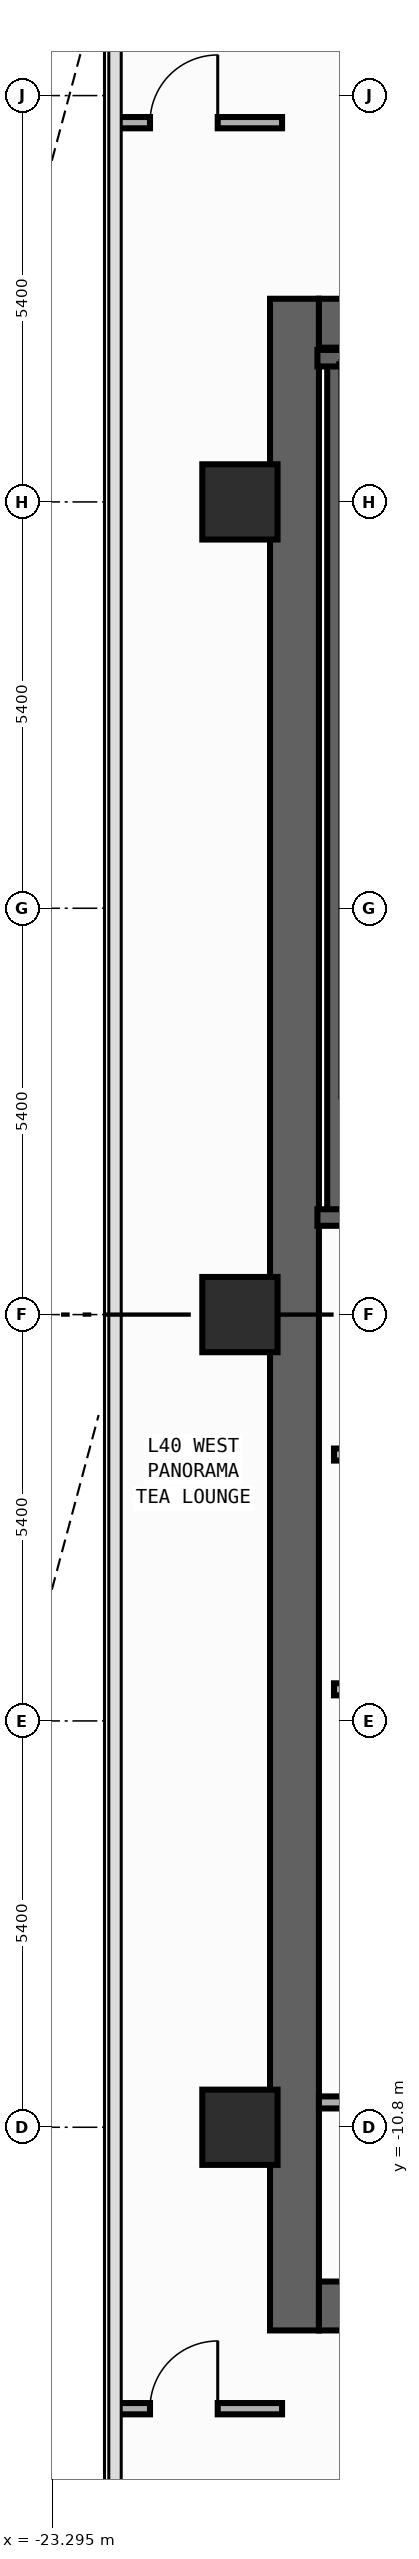
"""IFC4 building model, lengths in metres.
Left out: names, types, materials, properties, quantities, classifications, styles, units other than length and angle.
Written with IfcOpenShell. Run it as: python <this file> out.ifc"""

import sys

from ifc_helpers import new_model, si_unit, direction, frame, frame_2d, origin, origin_2d, place, context, subcontext, project, spatial, rectangle, extrude, element, fill, save


model = new_model("IFC4")
c1 = context("Model", 3, precision=1e-05, world=origin(), true_north=direction((0.0, 1.0)))
c2 = subcontext(c1, "Body", "Model", "MODEL_VIEW")
j1 = project(units=[si_unit("LENGTHUNIT", "METRE"), si_unit("PLANEANGLEUNIT", "RADIAN")], contexts=[c1])
p1 = place(None, origin())
s1 = spatial("IfcSite", under=j1, at=p1, CompositionType="ELEMENT")
p2 = place(p1, origin())
s2 = spatial("IfcBuilding", under=s1, at=p2, CompositionType="ELEMENT")
p3 = place(p2, frame((0.0, 0.0, 176.4)))
s3 = spatial("IfcBuildingStorey", under=s2, at=p3, CompositionType="ELEMENT", Elevation=176.4)
p4 = place(p3, frame((-20.075, -13.5, 0.0), z_axis=(0.0, 0.0, 1.0), x_axis=(0.0, 1.0, 0.0)))
e1 = element("IfcWall", 1, at=p4, inside=s3, PredefinedType="SHEAR", context=c2, shape_type="SweptSolid", body=[
    extrude(rectangle(XDim=27.0, YDim=0.65, at=frame_2d((13.5, 0.0))), origin(), (0.0, 0.0, 1.0), 3.54),
])
for number, where, z_axis, x_axis in (
    (2, (-19.75, -13.175, 0.0), (0.0, 0.0, 1.0), (1.0, 0.0, 0.0)),
    (3, (-19.75, 13.175, 0.0), (0.0, 0.0, 1.0), (1.0, 0.0, 0.0)),
):
    element("IfcWall", number, at=place(p3, frame(where, z_axis=z_axis, x_axis=x_axis)), inside=s3, PredefinedType="SHEAR", context=c2, shape_type="SweptSolid", body=[
        extrude(rectangle(XDim=7.1, YDim=0.65, at=frame_2d((3.55, 0.0))), origin(), (0.0, 0.0, 1.0), 3.54),
    ])
p5 = place(p3, frame((-19.53, 1.29, 0.0), z_axis=(0.0, 0.0, 1.0), x_axis=(0.0, 1.0, 0.0)))
e4 = element("IfcWall", 4, at=p5, inside=s3, PredefinedType="SHEAR", context=c2, shape_type="SweptSolid", body=[
    extrude(rectangle(XDim=11.42, YDim=0.22, at=frame_2d((5.71, 0.0))), origin(), (0.0, 0.0, 1.0), 3.54),
])
p6 = place(p3, frame((-19.77, 12.71, 0.0), z_axis=(0.0, 0.0, 1.0), x_axis=(1.0, 0.0, 0.0)))
e5 = element("IfcWall", 5, at=p6, inside=s3, PredefinedType="SHEAR", context=c2, shape_type="SweptSolid", body=[
    extrude(rectangle(XDim=4.065, YDim=0.22, at=frame_2d((2.032, 0.0))), origin(), (0.0, 0.0, 1.0), 3.54),
])
p7 = place(p3, frame((-19.77, 1.29, 0.0), z_axis=(0.0, 0.0, 1.0), x_axis=(1.0, 0.0, 0.0)))
e6 = element("IfcWall", 6, at=p7, inside=s3, PredefinedType="SHEAR", context=c2, shape_type="SweptSolid", body=[
    extrude(rectangle(XDim=4.065, YDim=0.22, at=frame_2d((2.032, 0.0))), origin(), (0.0, 0.0, 1.0), 3.54),
])
p8 = place(p7, frame((1.08, 0.0, 0.0)))
e7 = element("IfcOpeningElement", 7, at=p8, cuts=e6, PredefinedType="OPENING", context=c2, shape_type="SweptSolid", body=[
    extrude(rectangle(XDim=1.1, YDim=2.2, at=frame_2d((0.55, 1.1))), frame((0.0, 0.12, 0.0), z_axis=(0.0, -1.0, 0.0), x_axis=(1.0, 0.0, 0.0)), (0.0, 0.0, 1.0), 0.24),
])
for number, where, z_axis, x_axis in (
    (8, (-20.8, -10.8, 0.0), (0.0, 0.0, 1.0), (1.0, 0.0, 0.0)),
    (9, (-20.8, 0.0, 0.0), (0.0, 0.0, 1.0), (1.0, 0.0, 0.0)),
    (10, (-20.8, 10.8, 0.0), (0.0, 0.0, 1.0), (1.0, 0.0, 0.0)),
):
    element("IfcColumn", number, at=place(p3, frame(where, z_axis=z_axis, x_axis=x_axis)), inside=s3, PredefinedType="COLUMN", context=c2, shape_type="SweptSolid", body=[
        extrude(rectangle(XDim=1.0, YDim=1.0, at=origin_2d()), origin(), (0.0, 0.0, 1.0), 3.8),
    ])
p9 = place(p3, frame((-19.55, -1.86, 0.0), z_axis=(0.0, 0.0, 1.0), x_axis=(1.0, 0.0, 0.0)))
e11 = element("IfcWall", 11, at=p9, inside=s3, PredefinedType="STANDARD", context=c2, shape_type="SweptSolid", body=[
    extrude(rectangle(XDim=3.8, YDim=0.16, at=frame_2d((1.9, 0.0))), origin(), (0.0, 0.0, 1.0), 3.54),
])
p10 = place(p9, frame((1.18, 0.0, 0.0)))
e12 = element("IfcOpeningElement", 12, at=p10, cuts=e11, PredefinedType="OPENING", context=c2, shape_type="SweptSolid", body=[
    extrude(rectangle(XDim=1.15, YDim=2.2, at=frame_2d((0.575, 1.1))), frame((0.0, 0.09, 0.0), z_axis=(0.0, -1.0, 0.0), x_axis=(1.0, 0.0, 0.0)), (0.0, 0.0, 1.0), 0.18),
])
p11 = place(p3, frame((-19.55, -4.98, 0.0), z_axis=(0.0, 0.0, 1.0), x_axis=(1.0, 0.0, 0.0)))
e13 = element("IfcWall", 13, at=p11, inside=s3, PredefinedType="STANDARD", context=c2, shape_type="SweptSolid", body=[
    extrude(rectangle(XDim=3.8, YDim=0.16, at=frame_2d((1.9, 0.0))), origin(), (0.0, 0.0, 1.0), 3.54),
])
p12 = place(p3, frame((-19.75, -10.47, 0.0), z_axis=(0.0, 0.0, 1.0), x_axis=(1.0, 0.0, 0.0)))
e14 = element("IfcWall", 14, at=p12, inside=s3, PredefinedType="PARTITIONING", context=c2, shape_type="SweptSolid", body=[
    extrude(rectangle(XDim=2.44, YDim=0.16, at=frame_2d((1.22, 0.0))), origin(), (0.0, 0.0, 1.0), 3.54),
])
p13 = place(p3, frame((-22.455, 15.84, 0.0), z_axis=(0.0, 0.0, 1.0), x_axis=(1.0, 0.0, 0.0)))
e15 = element("IfcWall", 15, at=p13, inside=s3, PredefinedType="PARTITIONING", context=c2, shape_type="SweptSolid", body=[
    extrude(rectangle(XDim=2.215, YDim=0.15, at=frame_2d((1.107, 0.0))), origin(), (0.0, 0.0, 1.0), 3.54),
])
p14 = place(p13, frame((0.46, 0.0, 0.0)))
e16 = element("IfcOpeningElement", 16, at=p14, cuts=e15, PredefinedType="OPENING", context=c2, shape_type="SweptSolid", body=[
    extrude(rectangle(XDim=0.9, YDim=2.15, at=frame_2d((0.45, 1.075))), frame((0.0, 0.085, 0.0), z_axis=(0.0, -1.0, 0.0), x_axis=(1.0, 0.0, 0.0)), (0.0, 0.0, 1.0), 0.17),
])
p15 = place(p3, frame((-22.455, -14.54, 0.0), z_axis=(0.0, 0.0, 1.0), x_axis=(1.0, 0.0, 0.0)))
e17 = element("IfcWall", 17, at=p15, inside=s3, PredefinedType="PARTITIONING", context=c2, shape_type="SweptSolid", body=[
    extrude(rectangle(XDim=2.215, YDim=0.15, at=frame_2d((1.107, 0.0))), origin(), (0.0, 0.0, 1.0), 3.54),
])
p16 = place(p15, frame((0.46, 0.0, 0.0)))
e18 = element("IfcOpeningElement", 18, at=p16, cuts=e17, PredefinedType="OPENING", context=c2, shape_type="SweptSolid", body=[
    extrude(rectangle(XDim=0.9, YDim=2.15, at=frame_2d((0.45, 1.075))), frame((0.0, 0.085, 0.0), z_axis=(0.0, -1.0, 0.0), x_axis=(1.0, 0.0, 0.0)), (0.0, 0.0, 1.0), 0.17),
])
p17 = place(p14, origin())
e19 = element("IfcDoor", 19, at=p17, inside=s3, OperationType="SINGLE_SWING_RIGHT", PredefinedType="DOOR", context=c2, shape_type="SweptSolid", body=[
    extrude(rectangle(XDim=0.9, YDim=2.15, at=frame_2d((0.45, 1.075))), frame((0.0, 0.025, 0.0), z_axis=(0.0, -1.0, 0.0), x_axis=(1.0, 0.0, 0.0)), (0.0, 0.0, 1.0), 0.05),
])
fill(e16, e19)
p18 = place(p16, origin())
e20 = element("IfcDoor", 20, at=p18, inside=s3, OperationType="SINGLE_SWING_RIGHT", PredefinedType="DOOR", context=c2, shape_type="SweptSolid", body=[
    extrude(rectangle(XDim=0.9, YDim=2.15, at=frame_2d((0.45, 1.075))), frame((0.0, 0.025, 0.0), z_axis=(0.0, -1.0, 0.0), x_axis=(1.0, 0.0, 0.0)), (0.0, 0.0, 1.0), 0.05),
])
fill(e18, e20)
save(model, sys.argv[1])
